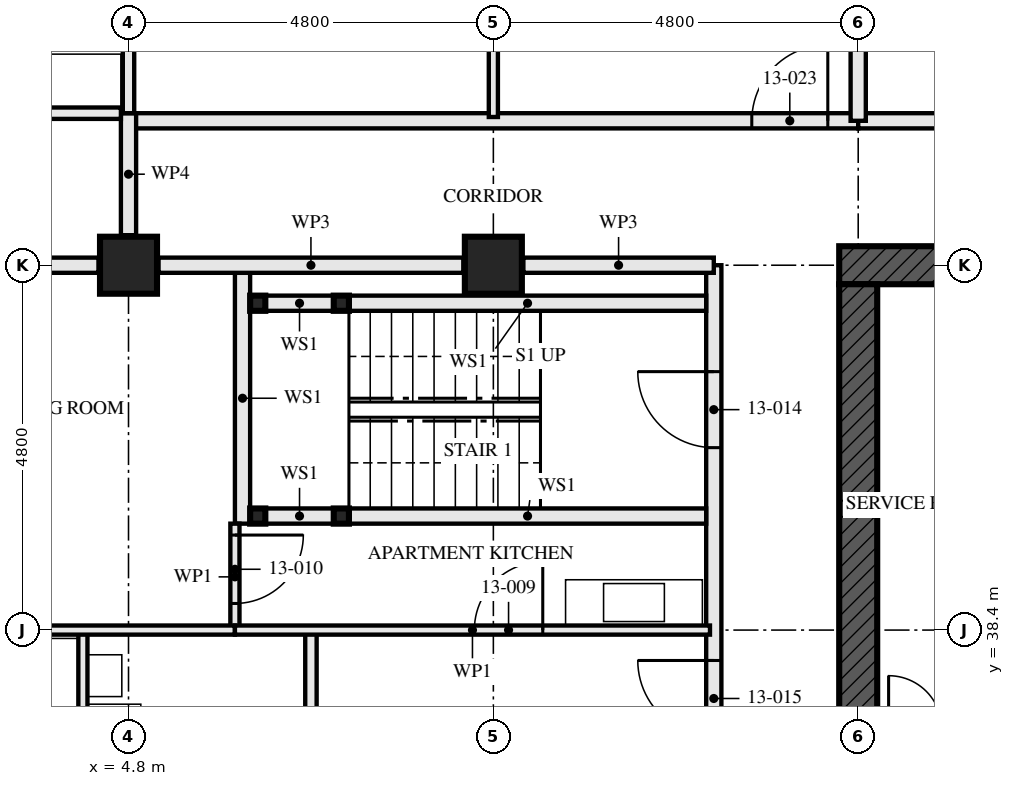
"""IFC4 building model, lengths in metres.
Left out: names, types, materials, properties, quantities, classifications, styles, units other than length and angle.
Written with IfcOpenShell. Run it as: python <this file> out.ifc"""

import sys

from ifc_helpers import new_model, si_unit, direction, frame, frame_2d, origin, origin_2d, place, context, subcontext, project, spatial, rectangle, hollow_rectangle, extrude, element, fill, save


model = new_model("IFC4")
c1 = context("Model", 3, precision=1e-05, world=origin(), true_north=direction((0.0, 1.0)))
c2 = subcontext(c1, "Body", "Model", "MODEL_VIEW")
j1 = project(units=[si_unit("LENGTHUNIT", "METRE"), si_unit("PLANEANGLEUNIT", "RADIAN")], contexts=[c1])
p1 = place(None, origin())
s1 = spatial("IfcSite", under=j1, at=p1, CompositionType="ELEMENT")
p2 = place(p1, origin())
s2 = spatial("IfcBuilding", under=s1, at=p2, CompositionType="ELEMENT")
p3 = place(p2, frame((0.0, 0.0, 51.5)))
s3 = spatial("IfcBuildingStorey", under=s2, at=p3, CompositionType="ELEMENT", Elevation=51.5)
for number, where, z_axis, x_axis in (
    (1, (4.8, 43.2, 0.0), (0.0, 0.0, 1.0), (0.0, 1.0, 0.0)),
    (2, (9.6, 43.2, 0.0), (0.0, 0.0, 1.0), (0.0, 1.0, 0.0)),
):
    element("IfcColumn", number, at=place(p3, frame(where, z_axis=z_axis, x_axis=x_axis)), inside=s3, PredefinedType="COLUMN", context=c2, shape_type="SweptSolid", body=[
        extrude(hollow_rectangle(XDim=0.75, YDim=0.75, WallThickness=0.08, at=origin_2d()), origin(), (0.0, 0.0, 1.0), 3.5),
    ])
p4 = place(p3, frame((29.05, 43.2, -0.17), z_axis=(0.0, 0.0, 1.0), x_axis=(-1.0, 0.0, 0.0)))
e3 = element("IfcWall", 3, at=p4, inside=s3, PredefinedType="SHEAR", context=c2, shape_type="SweptSolid", body=[
    extrude(rectangle(XDim=14.9, YDim=0.5, at=frame_2d((7.45, 0.0))), origin(), (0.0, 0.0, 1.0), 3.5),
])
p5 = place(p4, frame((6.85, 0.0, 0.17)))
e4 = element("IfcOpeningElement", 4, at=p5, cuts=e3, PredefinedType="OPENING", context=c2, shape_type="SweptSolid", body=[
    extrude(rectangle(XDim=1.2, YDim=2.1, at=frame_2d((0.6, 1.05))), frame((0.0, 0.26, 0.0), z_axis=(0.0, -1.0, 0.0), x_axis=(1.0, 0.0, 0.0)), (0.0, 0.0, 1.0), 0.521),
])
p6 = place(p3, frame((14.4, 42.95, -0.17), z_axis=(0.0, 0.0, 1.0), x_axis=(0.0, -1.0, 0.0)))
e5 = element("IfcWall", 5, at=p6, inside=s3, PredefinedType="SHEAR", context=c2, shape_type="SweptSolid", body=[
    extrude(rectangle(XDim=13.9, YDim=0.5, at=frame_2d((6.95, 0.0))), origin(), (0.0, 0.0, 1.0), 3.5),
])
p7 = place(p6, frame((6.35, 0.0, 0.17)))
e6 = element("IfcOpeningElement", 6, at=p7, cuts=e5, PredefinedType="OPENING", context=c2, shape_type="SweptSolid", body=[
    extrude(rectangle(XDim=1.2, YDim=2.1, at=frame_2d((0.6, 1.05))), frame((0.0, 0.26, 0.0), z_axis=(0.0, -1.0, 0.0), x_axis=(1.0, 0.0, 0.0)), (0.0, 0.0, 1.0), 0.521),
])
for number, where, z_axis, x_axis in (
    (7, (6.5, 42.7, 0.0), (0.0, 0.0, 1.0), (1.0, 0.0, 0.0)),
    (8, (6.5, 39.9, 0.0), (0.0, 0.0, 1.0), (1.0, 0.0, 0.0)),
    (9, (7.6, 42.7, 0.0), (0.0, 0.0, 1.0), (1.0, 0.0, 0.0)),
    (10, (7.6, 39.9, 0.0), (0.0, 0.0, 1.0), (1.0, 0.0, 0.0)),
):
    element("IfcColumn", number, at=place(p3, frame(where, z_axis=z_axis, x_axis=x_axis)), inside=s3, PredefinedType="COLUMN", context=c2, shape_type="SweptSolid", body=[
        extrude(hollow_rectangle(XDim=0.2, YDim=0.2, WallThickness=0.008, at=origin_2d()), origin(), (0.0, 0.0, 1.0), 3.33),
    ])
p8 = place(p3, frame((6.6, 42.7, 0.0), z_axis=(0.0, 0.0, 1.0), x_axis=(1.0, 0.0, 0.0)))
e11 = element("IfcWall", 11, at=p8, inside=s3, PredefinedType="SOLIDWALL", context=c2, shape_type="SweptSolid", body=[
    extrude(rectangle(XDim=0.9, YDim=0.2, at=frame_2d((0.45, 0.0))), origin(), (0.0, 0.0, 1.0), 2.99),
])
p9 = place(p3, frame((7.7, 42.7, 0.0), z_axis=(0.0, 0.0, 1.0), x_axis=(1.0, 0.0, 0.0)))
e12 = element("IfcWall", 12, at=p9, inside=s3, PredefinedType="SOLIDWALL", context=c2, shape_type="SweptSolid", body=[
    extrude(rectangle(XDim=4.7, YDim=0.2, at=frame_2d((2.35, 0.0))), origin(), (0.0, 0.0, 1.0), 2.99),
])
p10 = place(p3, frame((6.6, 39.9, 0.0), z_axis=(0.0, 0.0, 1.0), x_axis=(1.0, 0.0, 0.0)))
e13 = element("IfcWall", 13, at=p10, inside=s3, PredefinedType="SOLIDWALL", context=c2, shape_type="SweptSolid", body=[
    extrude(rectangle(XDim=0.9, YDim=0.2, at=frame_2d((0.45, 0.0))), origin(), (0.0, 0.0, 1.0), 2.99),
])
p11 = place(p3, frame((7.7, 39.9, 0.0), z_axis=(0.0, 0.0, 1.0), x_axis=(1.0, 0.0, 0.0)))
e14 = element("IfcWall", 14, at=p11, inside=s3, PredefinedType="SOLIDWALL", context=c2, shape_type="SweptSolid", body=[
    extrude(rectangle(XDim=4.7, YDim=0.2, at=frame_2d((2.35, 0.0))), origin(), (0.0, 0.0, 1.0), 2.99),
])
p12 = place(p3, frame((6.3, 43.1, 0.0), z_axis=(0.0, 0.0, 1.0), x_axis=(0.0, -1.0, 0.0)))
e15 = element("IfcWall", 15, at=p12, inside=s3, PredefinedType="SOLIDWALL", context=c2, shape_type="SweptSolid", body=[
    extrude(rectangle(XDim=3.3, YDim=0.2, at=frame_2d((1.65, 0.0))), origin(), (0.0, 0.0, 1.0), 3.33),
])
p13 = place(p3, frame((7.2, 38.4, 0.0), z_axis=(0.0, 0.0, 1.0), x_axis=(0.0, -1.0, 0.0)))
e16 = element("IfcWall", 16, at=p13, inside=s3, PredefinedType="PARTITIONING", context=c2, shape_type="SweptSolid", body=[
    extrude(rectangle(XDim=2.8, YDim=0.15, at=frame_2d((1.4, 0.0))), origin(), (0.0, 0.0, 1.0), 3.33),
])
p14 = place(p3, frame((6.2, 38.4, 0.0), z_axis=(0.0, 0.0, 1.0), x_axis=(1.0, 0.0, 0.0)))
e17 = element("IfcWall", 17, at=p14, inside=s3, PredefinedType="PARTITIONING", context=c2, shape_type="SweptSolid", body=[
    extrude(rectangle(XDim=6.25, YDim=0.12, at=frame_2d((3.125, 0.0))), origin(), (0.0, 0.0, 1.0), 2.55),
])
p15 = place(p14, frame((3.15, 0.0, 0.0)))
e18 = element("IfcOpeningElement", 18, at=p15, cuts=e17, PredefinedType="OPENING", context=c2, shape_type="SweptSolid", body=[
    extrude(rectangle(XDim=0.9, YDim=2.1, at=frame_2d((0.45, 1.05))), frame((0.0, 0.071, 0.0), z_axis=(0.0, -1.0, 0.0), x_axis=(1.0, 0.0, 0.0)), (0.0, 0.0, 1.0), 0.141),
])
p16 = place(p3, frame((6.2, 39.8, 0.0), z_axis=(0.0, 0.0, 1.0), x_axis=(0.0, -1.0, 0.0)))
e19 = element("IfcWall", 19, at=p16, inside=s3, PredefinedType="PARTITIONING", context=c2, shape_type="SweptSolid", body=[
    extrude(rectangle(XDim=1.4, YDim=0.12, at=frame_2d((0.7, 0.0))), origin(), (0.0, 0.0, 1.0), 3.33),
])
p17 = place(p16, frame((0.15, 0.0, 0.0)))
e20 = element("IfcOpeningElement", 20, at=p17, cuts=e19, PredefinedType="OPENING", context=c2, shape_type="SweptSolid", body=[
    extrude(rectangle(XDim=0.9, YDim=2.1, at=frame_2d((0.45, 1.05))), frame((0.0, 0.071, 0.0), z_axis=(0.0, -1.0, 0.0), x_axis=(1.0, 0.0, 0.0)), (0.0, 0.0, 1.0), 0.141),
])
p18 = place(p3, frame((4.2, 38.4, 0.0), z_axis=(0.0, 0.0, 1.0), x_axis=(0.0, -1.0, 0.0)))
e21 = element("IfcWall", 21, at=p18, inside=s3, PredefinedType="PARTITIONING", context=c2, shape_type="SweptSolid", body=[
    extrude(rectangle(XDim=4.8, YDim=0.12, at=frame_2d((2.4, 0.0))), origin(), (0.0, 0.0, 1.0), 3.33),
])
p19 = place(p18, frame((3.45, 0.0, 0.0)))
e22 = element("IfcOpeningElement", 22, at=p19, cuts=e21, PredefinedType="OPENING", context=c2, shape_type="SweptSolid", body=[
    extrude(rectangle(XDim=0.9, YDim=2.1, at=frame_2d((0.45, 1.05))), frame((0.0, 0.071, 0.0), z_axis=(0.0, -1.0, 0.0), x_axis=(1.0, 0.0, 0.0)), (0.0, 0.0, 1.0), 0.141),
])
p20 = place(p3, frame((0.395, 38.4, 0.0), z_axis=(0.0, 0.0, 1.0), x_axis=(1.0, 0.0, 0.0)))
e23 = element("IfcWall", 23, at=p20, inside=s3, PredefinedType="PARTITIONING", context=c2, shape_type="SweptSolid", body=[
    extrude(rectangle(XDim=5.805, YDim=0.12, at=frame_2d((2.902, 0.0))), origin(), (0.0, 0.0, 1.0), 2.55),
])
p21 = place(p3, frame((12.5, 43.2, 0.0), z_axis=(0.0, 0.0, 1.0), x_axis=(0.0, -1.0, 0.0)))
e24 = element("IfcWall", 24, at=p21, inside=s3, PredefinedType="PARTITIONING", context=c2, shape_type="SweptSolid", body=[
    extrude(rectangle(XDim=14.4, YDim=0.2, at=frame_2d((7.2, 0.0))), origin(), (0.0, 0.0, 1.0), 2.55),
])
p22 = place(p21, frame((1.4, 0.0, 0.0)))
e25 = element("IfcOpeningElement", 25, at=p22, cuts=e24, PredefinedType="OPENING", context=c2, shape_type="SweptSolid", body=[
    extrude(rectangle(XDim=1.0, YDim=2.1, at=frame_2d((0.5, 1.05))), frame((0.0, 0.111, 0.0), z_axis=(0.0, -1.0, 0.0), x_axis=(1.0, 0.0, 0.0)), (0.0, 0.0, 1.0), 0.221),
])
p23 = place(p21, frame((5.2, 0.0, 0.0)))
e26 = element("IfcOpeningElement", 26, at=p23, cuts=e24, PredefinedType="OPENING", context=c2, shape_type="SweptSolid", body=[
    extrude(rectangle(XDim=1.0, YDim=2.1, at=frame_2d((0.5, 1.05))), frame((0.0, 0.111, 0.0), z_axis=(0.0, -1.0, 0.0), x_axis=(1.0, 0.0, 0.0)), (0.0, 0.0, 1.0), 0.221),
])
p24 = place(p21, frame((10.0, 0.0, 0.0)))
e27 = element("IfcOpeningElement", 27, at=p24, cuts=e24, PredefinedType="OPENING", context=c2, shape_type="SweptSolid", body=[
    extrude(rectangle(XDim=1.0, YDim=2.1, at=frame_2d((0.5, 1.05))), frame((0.0, 0.111, 0.0), z_axis=(0.0, -1.0, 0.0), x_axis=(1.0, 0.0, 0.0)), (0.0, 0.0, 1.0), 0.221),
])
p25 = place(p3, frame((4.8, 48.2, 0.0), z_axis=(0.0, 0.0, 1.0), x_axis=(0.0, -1.0, 0.0)))
e28 = element("IfcWall", 28, at=p25, inside=s3, PredefinedType="PARTITIONING", context=c2, shape_type="SweptSolid", body=[
    extrude(rectangle(XDim=3.0, YDim=0.15, at=frame_2d((1.5, 0.0))), origin(), (0.0, 0.0, 1.0), 2.55),
])
p26 = place(p25, frame((1.05, 0.0, 0.0)))
e29 = element("IfcOpeningElement", 29, at=p26, cuts=e28, PredefinedType="OPENING", context=c2, shape_type="SweptSolid", body=[
    extrude(rectangle(XDim=0.9, YDim=2.1, at=frame_2d((0.45, 1.05))), frame((0.0, 0.085, 0.0), z_axis=(0.0, -1.0, 0.0), x_axis=(1.0, 0.0, 0.0)), (0.0, 0.0, 1.0), 0.171),
])
p27 = place(p3, frame((9.6, 53.4, 0.0), z_axis=(0.0, 0.0, 1.0), x_axis=(0.0, -1.0, 0.0)))
e30 = element("IfcWall", 30, at=p27, inside=s3, PredefinedType="PARTITIONING", context=c2, shape_type="SweptSolid", body=[
    extrude(rectangle(XDim=8.25, YDim=0.12, at=frame_2d((4.125, 0.0))), origin(), (0.0, 0.0, 1.0), 2.55),
])
p28 = place(p27, frame((5.15, 0.0, 0.0)))
e31 = element("IfcOpeningElement", 31, at=p28, cuts=e30, PredefinedType="OPENING", context=c2, shape_type="SweptSolid", body=[
    extrude(rectangle(XDim=0.9, YDim=2.1, at=frame_2d((0.45, 1.05))), frame((0.0, 0.071, 0.0), z_axis=(0.0, -1.0, 0.0), x_axis=(1.0, 0.0, 0.0)), (0.0, 0.0, 1.0), 0.141),
])
p29 = place(p3, frame((14.4, 45.1, 0.0), z_axis=(0.0, 0.0, 1.0), x_axis=(-1.0, 0.0, 0.0)))
e32 = element("IfcWall", 32, at=p29, inside=s3, PredefinedType="PARTITIONING", context=c2, shape_type="SweptSolid", body=[
    extrude(rectangle(XDim=9.6, YDim=0.2, at=frame_2d((4.8, 0.0))), origin(), (0.0, 0.0, 1.0), 3.33),
])
p30 = place(p29, frame((0.4, 0.0, 0.0)))
e33 = element("IfcOpeningElement", 33, at=p30, cuts=e32, PredefinedType="OPENING", context=c2, shape_type="SweptSolid", body=[
    extrude(rectangle(XDim=1.0, YDim=2.1, at=frame_2d((0.5, 1.05))), frame((0.0, 0.111, 0.0), z_axis=(0.0, -1.0, 0.0), x_axis=(1.0, 0.0, 0.0)), (0.0, 0.0, 1.0), 0.221),
])
p31 = place(p3, frame((4.8, 45.2, 0.0), z_axis=(0.0, 0.0, 1.0), x_axis=(0.0, -1.0, 0.0)))
e34 = element("IfcWall", 34, at=p31, inside=s3, PredefinedType="PARTITIONING", context=c2, shape_type="SweptSolid", body=[
    extrude(rectangle(XDim=1.605, YDim=0.2, at=frame_2d((0.802, 0.0))), origin(), (0.0, 0.0, 1.0), 3.33),
])
p32 = place(p3, frame((28.8, 45.1, 0.0), z_axis=(0.0, 0.0, 1.0), x_axis=(-1.0, 0.0, 0.0)))
e35 = element("IfcWall", 35, at=p32, inside=s3, PredefinedType="PARTITIONING", context=c2, shape_type="SweptSolid", body=[
    extrude(rectangle(XDim=14.4, YDim=0.2, at=frame_2d((7.2, 0.0))), origin(), (0.0, 0.0, 1.0), 3.33),
])
p33 = place(p32, frame((0.4, 0.0, 0.0)))
e36 = element("IfcOpeningElement", 36, at=p33, cuts=e35, PredefinedType="OPENING", context=c2, shape_type="SweptSolid", body=[
    extrude(rectangle(XDim=1.0, YDim=2.1, at=frame_2d((0.5, 1.05))), frame((0.0, 0.111, 0.0), z_axis=(0.0, -1.0, 0.0), x_axis=(1.0, 0.0, 0.0)), (0.0, 0.0, 1.0), 0.221),
])
p34 = place(p32, frame((5.2, 0.0, 0.0)))
e37 = element("IfcOpeningElement", 37, at=p34, cuts=e35, PredefinedType="OPENING", context=c2, shape_type="SweptSolid", body=[
    extrude(rectangle(XDim=1.0, YDim=2.1, at=frame_2d((0.5, 1.05))), frame((0.0, 0.111, 0.0), z_axis=(0.0, -1.0, 0.0), x_axis=(1.0, 0.0, 0.0)), (0.0, 0.0, 1.0), 0.221),
])
p35 = place(p32, frame((10.0, 0.0, 0.0)))
e38 = element("IfcOpeningElement", 38, at=p35, cuts=e35, PredefinedType="OPENING", context=c2, shape_type="SweptSolid", body=[
    extrude(rectangle(XDim=1.0, YDim=2.1, at=frame_2d((0.5, 1.05))), frame((0.0, 0.111, 0.0), z_axis=(0.0, -1.0, 0.0), x_axis=(1.0, 0.0, 0.0)), (0.0, 0.0, 1.0), 0.221),
])
p36 = place(p3, frame((12.5, 43.2, 0.0), z_axis=(0.0, 0.0, 1.0), x_axis=(-1.0, 0.0, 0.0)))
e39 = element("IfcWall", 39, at=p36, inside=s3, PredefinedType="PARTITIONING", context=c2, shape_type="SweptSolid", body=[
    extrude(rectangle(XDim=2.505, YDim=0.2, at=frame_2d((1.252, 0.0))), origin(), (0.0, 0.0, 1.0), 2.32),
])
p37 = place(p3, frame((9.205, 43.2, 0.0), z_axis=(0.0, 0.0, 1.0), x_axis=(-1.0, 0.0, 0.0)))
e40 = element("IfcWall", 40, at=p37, inside=s3, PredefinedType="PARTITIONING", context=c2, shape_type="SweptSolid", body=[
    extrude(rectangle(XDim=4.01, YDim=0.2, at=frame_2d((2.005, 0.0))), origin(), (0.0, 0.0, 1.0), 2.32),
])
p38 = place(p3, frame((4.405, 43.2, 0.0), z_axis=(0.0, 0.0, 1.0), x_axis=(-1.0, 0.0, 0.0)))
e41 = element("IfcWall", 41, at=p38, inside=s3, PredefinedType="PARTITIONING", context=c2, shape_type="SweptSolid", body=[
    extrude(rectangle(XDim=4.085, YDim=0.2, at=frame_2d((2.042, 0.0))), origin(), (0.0, 0.0, 1.0), 2.32),
])
p39 = place(p3, frame((14.4, 45.1, 0.0), z_axis=(0.0, 0.0, 1.0), x_axis=(0.0, 1.0, 0.0)))
e42 = element("IfcWall", 42, at=p39, inside=s3, PredefinedType="PARTITIONING", context=c2, shape_type="SweptSolid", body=[
    extrude(rectangle(XDim=2.555, YDim=0.2, at=frame_2d((1.277, 0.0))), origin(), (0.0, 0.0, 1.0), 2.32),
])
p40 = place(p3, frame((4.7, 45.2, 0.0), z_axis=(0.0, 0.0, 1.0), x_axis=(-1.0, 0.0, 0.0)))
e43 = element("IfcWall", 43, at=p40, inside=s3, PredefinedType="PARTITIONING", context=c2, shape_type="SweptSolid", body=[
    extrude(rectangle(XDim=5.135, YDim=0.15, at=frame_2d((2.567, 0.0))), origin(), (0.0, 0.0, 1.0), 2.32),
])
p41 = place(p15, origin())
e44 = element("IfcDoor", 44, at=p41, inside=s3, OperationType="SINGLE_SWING_LEFT", PredefinedType="DOOR", context=c2, shape_type="SweptSolid", body=[
    extrude(rectangle(XDim=0.9, YDim=2.1, at=frame_2d((0.45, 1.05))), frame((0.0, 0.022, 0.0), z_axis=(0.0, -1.0, 0.0), x_axis=(1.0, 0.0, 0.0)), (0.0, 0.0, 1.0), 0.044),
])
fill(e18, e44)
p42 = place(p17, origin())
e45 = element("IfcDoor", 45, at=p42, inside=s3, OperationType="SINGLE_SWING_RIGHT", PredefinedType="DOOR", context=c2, shape_type="SweptSolid", body=[
    extrude(rectangle(XDim=0.9, YDim=2.1, at=frame_2d((0.45, 1.05))), frame((0.0, 0.022, 0.0), z_axis=(0.0, -1.0, 0.0), x_axis=(1.0, 0.0, 0.0)), (0.0, 0.0, 1.0), 0.044),
])
fill(e20, e45)
p43 = place(p22, frame((1.0, 0.0, 0.0), z_axis=(0.0, 0.0, 1.0), x_axis=(-1.0, 0.0, 0.0)))
e46 = element("IfcDoor", 46, at=p43, inside=s3, OperationType="SINGLE_SWING_LEFT", PredefinedType="DOOR", context=c2, shape_type="SweptSolid", body=[
    extrude(rectangle(XDim=1.0, YDim=2.1, at=frame_2d((0.5, 1.05))), frame((0.0, 0.032, 0.0), z_axis=(0.0, -1.0, 0.0), x_axis=(1.0, 0.0, 0.0)), (0.0, 0.0, 1.0), 0.064),
])
fill(e25, e46)
p44 = place(p23, frame((1.0, 0.0, 0.0), z_axis=(0.0, 0.0, 1.0), x_axis=(-1.0, 0.0, 0.0)))
e47 = element("IfcDoor", 47, at=p44, inside=s3, OperationType="SINGLE_SWING_LEFT", PredefinedType="DOOR", context=c2, shape_type="SweptSolid", body=[
    extrude(rectangle(XDim=1.0, YDim=2.1, at=frame_2d((0.5, 1.05))), frame((0.0, 0.027, 0.0), z_axis=(0.0, -1.0, 0.0), x_axis=(1.0, 0.0, 0.0)), (0.0, 0.0, 1.0), 0.054),
])
fill(e26, e47)
p45 = place(p30, frame((1.0, 0.0, 0.0), z_axis=(0.0, 0.0, 1.0), x_axis=(-1.0, 0.0, 0.0)))
e48 = element("IfcDoor", 48, at=p45, inside=s3, OperationType="SINGLE_SWING_LEFT", PredefinedType="DOOR", context=c2, shape_type="SweptSolid", body=[
    extrude(rectangle(XDim=1.0, YDim=2.1, at=frame_2d((0.5, 1.05))), frame((0.0, 0.027, 0.0), z_axis=(0.0, -1.0, 0.0), x_axis=(1.0, 0.0, 0.0)), (0.0, 0.0, 1.0), 0.054),
])
fill(e33, e48)
save(model, sys.argv[1])
